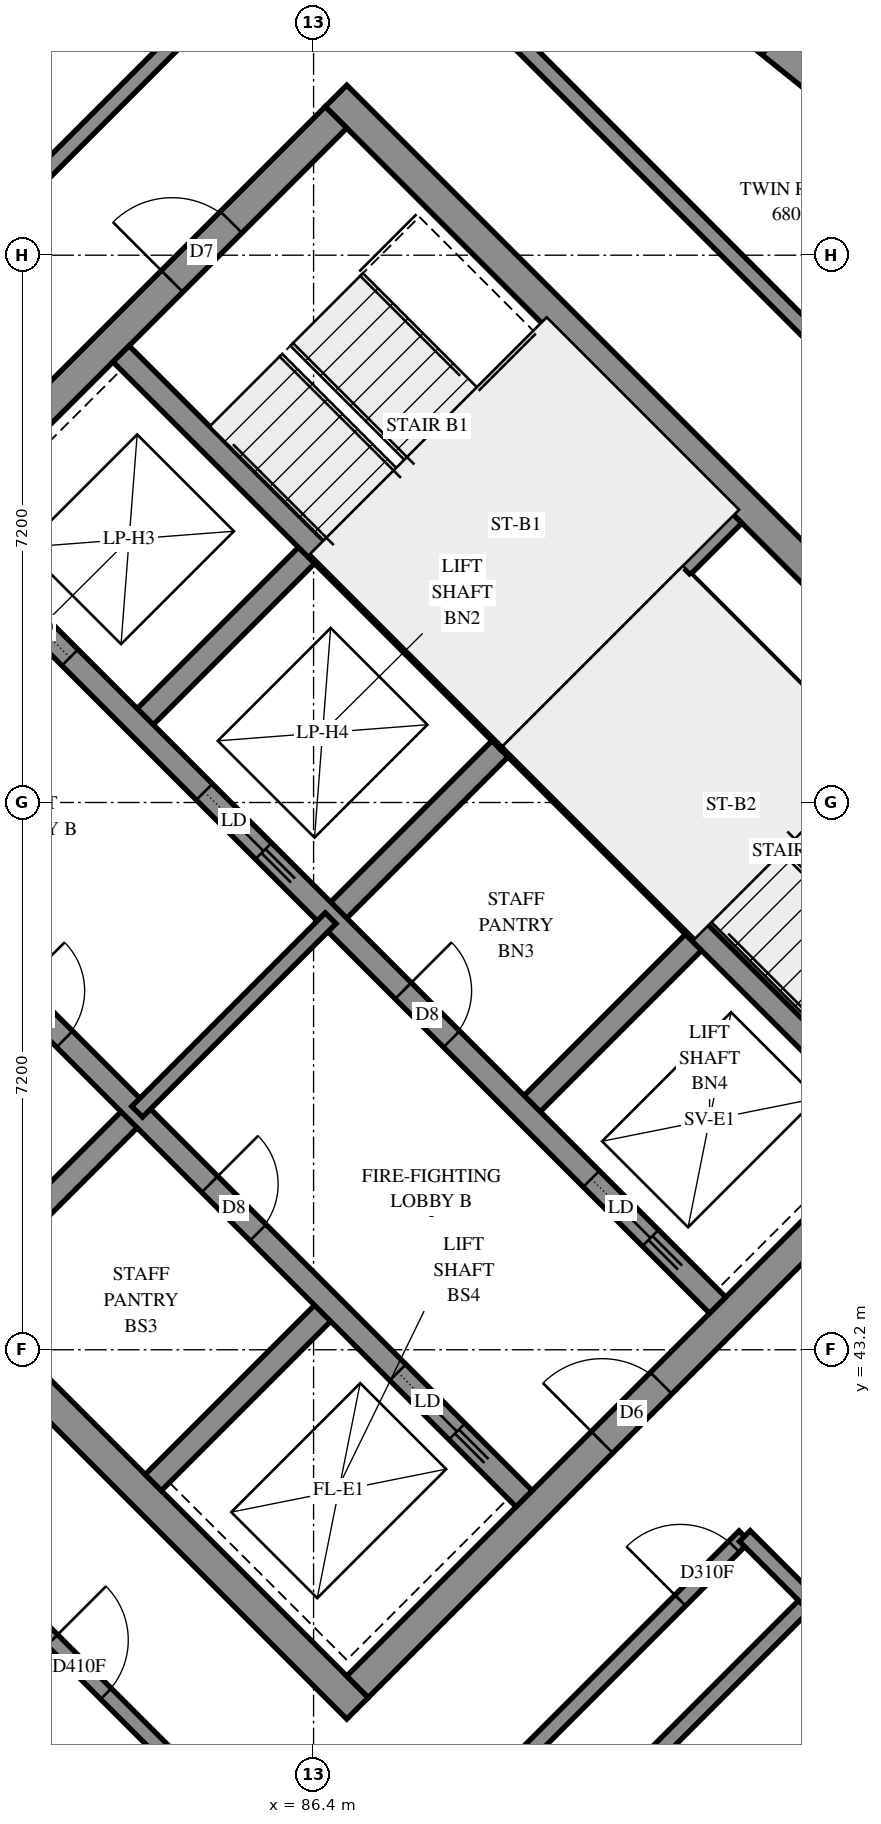
"""IFC4 building model, lengths in metres.
Left out: names, types, materials, properties, quantities, classifications, styles, units other than length and angle.
Written with IfcOpenShell. Run it as: python <this file> out.ifc"""

import sys

from ifc_helpers import new_model, si_unit, direction, frame, frame_2d, origin, place, context, subcontext, project, spatial, polyline, rectangle, outline, extrude, element, fill, save


model = new_model("IFC4")
c1 = context("Model", 3, precision=1e-05, world=origin(), true_north=direction((0.0, 1.0)))
c2 = subcontext(c1, "Body", "Model", "MODEL_VIEW")
j1 = project(units=[si_unit("LENGTHUNIT", "METRE"), si_unit("PLANEANGLEUNIT", "RADIAN")], contexts=[c1])
p1 = place(None, origin())
s1 = spatial("IfcSite", under=j1, at=p1, CompositionType="ELEMENT")
p2 = place(p1, origin())
s2 = spatial("IfcBuilding", under=s1, at=p2, CompositionType="ELEMENT")
p3 = place(p2, frame((0.0, 0.0, 250.6)))
s3 = spatial("IfcBuildingStorey", under=s2, at=p3, CompositionType="ELEMENT", Elevation=250.6)
p4 = place(p3, frame((76.23, 49.231, -0.3), z_axis=(0.0, 0.0, 1.0), x_axis=(0.7071034917, -0.7071100706, 0.0)))
e1 = element("IfcWall", 1, at=p4, inside=s3, PredefinedType="SHEAR", context=c2, shape_type="SweptSolid", body=[
    extrude(rectangle(XDim=15.2, YDim=0.4, at=frame_2d((7.6, 0.0))), origin(), (0.0, 0.0, 1.0), 2.7),
])
p5 = place(p3, frame((86.695, 59.696, -0.3), z_axis=(0.0, 0.0, 1.0), x_axis=(0.7071100706, -0.7071034917, 0.0)))
e2 = element("IfcWall", 2, at=p5, inside=s3, PredefinedType="SHEAR", context=c2, shape_type="SweptSolid", body=[
    extrude(rectangle(XDim=15.2, YDim=0.4, at=frame_2d((7.6, 0.0))), origin(), (0.0, 0.0, 1.0), 2.7),
])
p6 = place(p5, frame((10.4, 0.0, 0.3)))
e3 = element("IfcOpeningElement", 3, at=p6, cuts=e2, PredefinedType="OPENING", context=c2, shape_type="SweptSolid", body=[
    extrude(rectangle(XDim=0.8, YDim=2.1, at=frame_2d((0.4, 1.05))), frame((0.0, 0.21, 0.0), z_axis=(0.0, -1.0, 0.0), x_axis=(1.0, 0.0, 0.0)), (0.0, 0.0, 1.0), 0.42),
])
p7 = place(p3, frame((76.513, 49.231, -0.3), z_axis=(0.0, 0.0, 1.0), x_axis=(0.7071067812, 0.7071067812, 0.0)))
e4 = element("IfcWall", 4, at=p7, inside=s3, PredefinedType="SHEAR", context=c2, shape_type="SweptSolid", body=[
    extrude(rectangle(XDim=14.4, YDim=0.4, at=frame_2d((7.2, 0.0))), origin(), (0.0, 0.0, 1.0), 2.7),
])
p8 = place(p7, frame((4.55, 0.0, 0.3)))
e5 = element("IfcOpeningElement", 5, at=p8, cuts=e4, PredefinedType="OPENING", context=c2, shape_type="SweptSolid", body=[
    extrude(rectangle(XDim=1.1, YDim=2.1, at=frame_2d((0.55, 1.05))), frame((0.0, 0.21, 0.0), z_axis=(0.0, -1.0, 0.0), x_axis=(1.0, 0.0, 0.0)), (0.0, 0.0, 1.0), 0.42),
])
p9 = place(p7, frame((11.35, 0.0, 0.3)))
e6 = element("IfcOpeningElement", 6, at=p9, cuts=e4, PredefinedType="OPENING", context=c2, shape_type="SweptSolid", body=[
    extrude(rectangle(XDim=1.1, YDim=2.1, at=frame_2d((0.55, 1.05))), frame((0.0, 0.21, 0.0), z_axis=(0.0, -1.0, 0.0), x_axis=(1.0, 0.0, 0.0)), (0.0, 0.0, 1.0), 0.42),
])
p10 = place(p3, frame((86.978, 38.766, -0.3), z_axis=(0.0, 0.0, 1.0), x_axis=(0.7071067812, 0.7071067812, 0.0)))
e7 = element("IfcWall", 7, at=p10, inside=s3, PredefinedType="SHEAR", context=c2, shape_type="SweptSolid", body=[
    extrude(rectangle(XDim=14.4, YDim=0.4, at=frame_2d((7.2, 0.0))), origin(), (0.0, 0.0, 1.0), 2.7),
])
p11 = place(p10, frame((4.55, 0.0, 0.3)))
e8 = element("IfcOpeningElement", 8, at=p11, cuts=e7, PredefinedType="OPENING", context=c2, shape_type="SweptSolid", body=[
    extrude(rectangle(XDim=1.1, YDim=2.1, at=frame_2d((0.55, 1.05))), frame((0.0, 0.21, 0.0), z_axis=(0.0, -1.0, 0.0), x_axis=(1.0, 0.0, 0.0)), (0.0, 0.0, 1.0), 0.42),
])
p12 = place(p10, frame((11.35, 0.0, 0.3)))
e9 = element("IfcOpeningElement", 9, at=p12, cuts=e7, PredefinedType="OPENING", context=c2, shape_type="SweptSolid", body=[
    extrude(rectangle(XDim=1.1, YDim=2.1, at=frame_2d((0.55, 1.05))), frame((0.0, 0.21, 0.0), z_axis=(0.0, -1.0, 0.0), x_axis=(1.0, 0.0, 0.0)), (0.0, 0.0, 1.0), 0.42),
])
p13 = place(p3, frame((84.079, 51.423, 0.0), z_axis=(0.0, 0.0, 1.0), x_axis=(0.7071219326, 0.7070916295, 0.0)))
e10 = element("IfcWall", 10, at=p13, inside=s3, PredefinedType="SOLIDWALL", context=c2, shape_type="SweptSolid", body=[
    extrude(rectangle(XDim=3.3, YDim=0.3, at=frame_2d((1.65, 0.0))), origin(), (0.0, 0.0, 1.0), 3.1),
])
p14 = place(p3, frame((81.746, 43.999, 0.0), z_axis=(0.0, 0.0, 1.0), x_axis=(0.7071067812, 0.7071067812, 0.0)))
e11 = element("IfcWall", 11, at=p14, inside=s3, PredefinedType="SOLIDWALL", context=c2, shape_type="SweptSolid", body=[
    extrude(rectangle(XDim=3.3, YDim=0.3, at=frame_2d((1.65, 0.0))), origin(), (0.0, 0.0, 1.0), 3.1),
])
p15 = place(p3, frame((86.625, 48.878, 0.0), z_axis=(0.0, 0.0, 1.0), x_axis=(0.7071067812, 0.7071067812, 0.0)))
e12 = element("IfcWall", 12, at=p15, inside=s3, PredefinedType="SOLIDWALL", context=c2, shape_type="SweptSolid", body=[
    extrude(rectangle(XDim=3.3, YDim=0.3, at=frame_2d((1.65, 0.0))), origin(), (0.0, 0.0, 1.0), 3.1),
])
p16 = place(p3, frame((84.291, 41.453, 0.0), z_axis=(0.0, 0.0, 1.0), x_axis=(0.7071067812, 0.7071067812, 0.0)))
e13 = element("IfcWall", 13, at=p16, inside=s3, PredefinedType="SOLIDWALL", context=c2, shape_type="SweptSolid", body=[
    extrude(rectangle(XDim=3.3, YDim=0.3, at=frame_2d((1.65, 0.0))), origin(), (0.0, 0.0, 1.0), 3.1),
])
p17 = place(p3, frame((89.17, 46.332, 0.0), z_axis=(0.0, 0.0, 1.0), x_axis=(0.7071067812, 0.7071067812, 0.0)))
e14 = element("IfcWall", 14, at=p17, inside=s3, PredefinedType="SOLIDWALL", context=c2, shape_type="SweptSolid", body=[
    extrude(rectangle(XDim=3.3, YDim=0.3, at=frame_2d((1.65, 0.0))), origin(), (0.0, 0.0, 1.0), 3.1),
])
p18 = place(p3, frame((78.988, 51.423, 0.0), z_axis=(0.0, 0.0, 1.0), x_axis=(0.7071067812, -0.7071067812, 0.0)))
e15 = element("IfcWall", 15, at=p18, inside=s3, PredefinedType="SOLIDWALL", context=c2, shape_type="SweptSolid", body=[
    extrude(rectangle(XDim=14.4, YDim=0.3, at=frame_2d((7.2, 0.0))), origin(), (0.0, 0.0, 1.0), 3.1),
])
p19 = place(p18, frame((1.35, 0.0, 0.0)))
e16 = element("IfcOpeningElement", 16, at=p19, cuts=e15, PredefinedType="OPENING", context=c2, shape_type="SweptSolid", body=[
    extrude(rectangle(XDim=0.9, YDim=2.1, at=frame_2d((0.45, 1.05))), frame((0.0, 0.16, 0.0), z_axis=(0.0, -1.0, 0.0), x_axis=(1.0, 0.0, 0.0)), (0.0, 0.0, 1.0), 0.32),
])
p20 = place(p18, frame((4.95, 0.0, 0.0)))
e17 = element("IfcOpeningElement", 17, at=p20, cuts=e15, PredefinedType="OPENING", context=c2, shape_type="SweptSolid", body=[
    extrude(rectangle(XDim=0.9, YDim=2.1, at=frame_2d((0.45, 1.05))), frame((0.0, 0.16, 0.0), z_axis=(0.0, -1.0, 0.0), x_axis=(1.0, 0.0, 0.0)), (0.0, 0.0, 1.0), 0.32),
])
p21 = place(p18, frame((8.55, 0.0, 0.0)))
e18 = element("IfcOpeningElement", 18, at=p21, cuts=e15, PredefinedType="OPENING", context=c2, shape_type="SweptSolid", body=[
    extrude(rectangle(XDim=0.9, YDim=2.1, at=frame_2d((0.45, 1.05))), frame((0.0, 0.16, 0.0), z_axis=(0.0, -1.0, 0.0), x_axis=(1.0, 0.0, 0.0)), (0.0, 0.0, 1.0), 0.32),
])
p22 = place(p18, frame((12.05, 0.0, 0.0)))
e19 = element("IfcOpeningElement", 19, at=p22, cuts=e15, PredefinedType="OPENING", context=c2, shape_type="SweptSolid", body=[
    extrude(rectangle(XDim=1.1, YDim=2.1, at=frame_2d((0.55, 1.05))), frame((0.0, 0.16, 0.0), z_axis=(0.0, -1.0, 0.0), x_axis=(1.0, 0.0, 0.0)), (0.0, 0.0, 1.0), 0.32),
])
p23 = place(p3, frame((81.534, 53.969, 0.0), z_axis=(0.0, 0.0, 1.0), x_axis=(0.707103309, -0.7071102534, 0.0)))
e20 = element("IfcWall", 20, at=p23, inside=s3, PredefinedType="SOLIDWALL", context=c2, shape_type="SweptSolid", body=[
    extrude(rectangle(XDim=14.4, YDim=0.3, at=frame_2d((7.2, 0.0))), origin(), (0.0, 0.0, 1.0), 3.1),
])
p24 = place(p23, frame((8.55, 0.0, 0.0)))
e21 = element("IfcOpeningElement", 21, at=p24, cuts=e20, PredefinedType="OPENING", context=c2, shape_type="SweptSolid", body=[
    extrude(rectangle(XDim=0.9, YDim=2.1, at=frame_2d((0.45, 1.05))), frame((0.0, 0.16, 0.0), z_axis=(0.0, -1.0, 0.0), x_axis=(1.0, 0.0, 0.0)), (0.0, 0.0, 1.0), 0.32),
])
p25 = place(p23, frame((1.25, 0.0, 0.0)))
e22 = element("IfcOpeningElement", 22, at=p25, cuts=e20, PredefinedType="OPENING", context=c2, shape_type="SweptSolid", body=[
    extrude(rectangle(XDim=1.1, YDim=2.1, at=frame_2d((0.55, 1.05))), frame((0.0, 0.16, 0.0), z_axis=(0.0, -1.0, 0.0), x_axis=(1.0, 0.0, 0.0)), (0.0, 0.0, 1.0), 0.32),
])
p26 = place(p23, frame((4.85, 0.0, 0.0)))
e23 = element("IfcOpeningElement", 23, at=p26, cuts=e20, PredefinedType="OPENING", context=c2, shape_type="SweptSolid", body=[
    extrude(rectangle(XDim=1.1, YDim=2.1, at=frame_2d((0.55, 1.05))), frame((0.0, 0.16, 0.0), z_axis=(0.0, -1.0, 0.0), x_axis=(1.0, 0.0, 0.0)), (0.0, 0.0, 1.0), 0.32),
])
p27 = place(p23, frame((12.05, 0.0, 0.0)))
e24 = element("IfcOpeningElement", 24, at=p27, cuts=e20, PredefinedType="OPENING", context=c2, shape_type="SweptSolid", body=[
    extrude(rectangle(XDim=1.1, YDim=2.1, at=frame_2d((0.55, 1.05))), frame((0.0, 0.16, 0.0), z_axis=(0.0, -1.0, 0.0), x_axis=(1.0, 0.0, 0.0)), (0.0, 0.0, 1.0), 0.32),
])
for number, where, z_axis, x_axis in (
    (25, (83.867, 56.302, 0.0), (0.0, 0.0, 1.0), (0.707, -0.707, 0.0)),
    (26, (88.958, 51.211, 0.0), (0.0, 0.0, 1.0), (0.707, -0.707, 0.0)),
):
    element("IfcWall", number, at=place(p3, frame(where, z_axis=z_axis, x_axis=x_axis)), inside=s3, PredefinedType="SOLIDWALL", context=c2, shape_type="SweptSolid", body=[
        extrude(rectangle(XDim=7.2, YDim=0.3, at=frame_2d((3.6, 0.0))), origin(), (0.0, 0.0, 1.0), 3.1),
    ])
p28 = place(p3, frame((88.958, 51.211, 0.0), z_axis=(0.0, 0.0, 1.0), x_axis=(0.7071067812, 0.7071067812, 0.0)))
e27 = element("IfcWall", 27, at=p28, inside=s3, PredefinedType="SOLIDWALL", context=c2, shape_type="SweptSolid", body=[
    extrude(rectangle(XDim=4.2, YDim=0.3, at=frame_2d((2.1, 0.0))), origin(), (0.0, 0.0, 1.0), 3.1),
])
p29 = place(p3, frame((93.637, 59.451, 0.0), z_axis=(0.0, 0.0, 1.0), x_axis=(-0.7792026718, 0.6267720449, 0.0)))
e28 = element("IfcWall", 28, at=p29, inside=s3, PredefinedType="SOLIDWALL", context=c2, shape_type="SweptSolid", body=[
    extrude(outline(polyline([(-0.024, -0.225), (3.325, -0.225), (3.373, 0.225), (0.024, 0.225), (-0.024, -0.225)])), origin(), (0.0, 0.0, 1.0), 3.1),
])
p30 = place(p29, frame((1.519, 0.0, 0.45)))
e29 = element("IfcOpeningElement", 29, at=p30, cuts=e28, PredefinedType="OPENING", context=c2, shape_type="SweptSolid", body=[
    extrude(rectangle(XDim=1.2, YDim=2.55, at=frame_2d((0.6, 1.275))), frame((0.0, 0.235, 0.0), z_axis=(0.0, -1.0, 0.0), x_axis=(1.0, 0.0, 0.0)), (0.0, 0.0, 1.0), 0.47),
])
p31 = place(p3, frame((91.313, 53.354, 0.0), z_axis=(0.0, 0.0, 1.0), x_axis=(0.7071067812, -0.7071067812, 0.0)))
e30 = element("IfcWall", 30, at=p31, inside=s3, PredefinedType="PARTITIONING", context=c2, shape_type="SweptSolid", body=[
    extrude(rectangle(XDim=5.65, YDim=0.15, at=frame_2d((2.825, 0.0))), origin(), (0.0, 0.0, 1.0), 3.1),
])
p32 = place(p3, frame((84.079, 46.332, 0.0), z_axis=(0.0, 0.0, 1.0), x_axis=(0.7071067812, 0.7071067812, 0.0)))
e31 = element("IfcWall", 31, at=p32, inside=s3, PredefinedType="PARTITIONING", context=c2, shape_type="SweptSolid", body=[
    extrude(rectangle(XDim=3.6, YDim=0.2, at=frame_2d((1.8, 0.0))), origin(), (0.0, 0.0, 1.0), 3.1),
])
p33 = place(p3, frame((84.939, 31.92, 0.0), z_axis=(0.0, 0.0, 1.0), x_axis=(0.7071067812, 0.7071067812, 0.0)))
e32 = element("IfcWall", 32, at=p33, inside=s3, PredefinedType="PARTITIONING", context=c2, shape_type="SweptSolid", body=[
    extrude(rectangle(XDim=11.283, YDim=0.2, at=frame_2d((5.641, 0.0))), origin(), (0.0, 0.0, 1.0), 3.1),
])
p34 = place(p3, frame((79.907, 55.739, 0.0), z_axis=(0.0, 0.0, 1.0), x_axis=(0.7071067812, 0.7071067812, 0.0)))
e33 = element("IfcWall", 33, at=p34, inside=s3, PredefinedType="PARTITIONING", context=c2, shape_type="SweptSolid", body=[
    extrude(rectangle(XDim=9.798, YDim=0.2, at=frame_2d((4.899, 0.0))), origin(), (0.0, 0.0, 1.0), 3.1),
])
p35 = place(p34, frame((0.617, 0.0, 0.0)))
e34 = element("IfcOpeningElement", 34, at=p35, cuts=e33, PredefinedType="OPENING", context=c2, shape_type="SweptSolid", body=[
    extrude(rectangle(XDim=1.0, YDim=2.1, at=frame_2d((0.5, 1.05))), frame((0.0, 0.11, 0.0), z_axis=(0.0, -1.0, 0.0), x_axis=(1.0, 0.0, 0.0)), (0.0, 0.0, 1.0), 0.22),
])
p36 = place(p3, frame((80.747, 41.597, 0.0), z_axis=(0.0, 0.0, 1.0), x_axis=(0.7071067812, -0.7071067812, 0.0)))
e35 = element("IfcWall", 35, at=p36, inside=s3, PredefinedType="PARTITIONING", context=c2, shape_type="SweptSolid", body=[
    extrude(rectangle(XDim=8.607, YDim=0.2, at=frame_2d((4.303, 0.0))), origin(), (0.0, 0.0, 1.0), 3.1),
])
p37 = place(p36, frame((0.195, 0.0, 0.0)))
e36 = element("IfcOpeningElement", 36, at=p37, cuts=e35, PredefinedType="OPENING", context=c2, shape_type="SweptSolid", body=[
    extrude(rectangle(XDim=1.0, YDim=2.1, at=frame_2d((0.5, 1.05))), frame((0.0, 0.11, 0.0), z_axis=(0.0, -1.0, 0.0), x_axis=(1.0, 0.0, 0.0)), (0.0, 0.0, 1.0), 0.22),
])
p38 = place(p36, frame((3.133, 0.0, 0.0)))
e37 = element("IfcOpeningElement", 37, at=p38, cuts=e35, PredefinedType="OPENING", context=c2, shape_type="SweptSolid", body=[
    extrude(rectangle(XDim=1.0, YDim=2.1, at=frame_2d((0.5, 1.05))), frame((0.0, 0.11, 0.0), z_axis=(0.0, -1.0, 0.0), x_axis=(1.0, 0.0, 0.0)), (0.0, 0.0, 1.0), 0.22),
])
p39 = place(p3, frame((86.836, 35.514, 0.0), z_axis=(0.0, 0.0, 1.0), x_axis=(0.7071067812, 0.7071067812, 0.0)))
e38 = element("IfcWall", 38, at=p39, inside=s3, PredefinedType="PARTITIONING", context=c2, shape_type="SweptSolid", body=[
    extrude(rectangle(XDim=7.399, YDim=0.2, at=frame_2d((3.7, 0.0))), origin(), (0.0, 0.0, 1.0), 3.1),
])
p40 = place(p39, frame((6.207, 0.0, 0.0)))
e39 = element("IfcOpeningElement", 39, at=p40, cuts=e38, PredefinedType="OPENING", context=c2, shape_type="SweptSolid", body=[
    extrude(rectangle(XDim=1.0, YDim=2.1, at=frame_2d((0.5, 1.05))), frame((0.0, 0.11, 0.0), z_axis=(0.0, -1.0, 0.0), x_axis=(1.0, 0.0, 0.0)), (0.0, 0.0, 1.0), 0.22),
])
p41 = place(p3, frame((88.535, 60.971, 0.0), z_axis=(0.0, 0.0, 1.0), x_axis=(0.7069678741, -0.707245661, 0.0)))
e40 = element("IfcWall", 40, at=p41, inside=s3, PredefinedType="PARTITIONING", context=c2, shape_type="SweptSolid", body=[
    extrude(rectangle(XDim=7.2, YDim=0.2, at=frame_2d((3.6, 0.0))), origin(), (0.0, 0.0, 1.0), 3.1),
])
p42 = place(p3, frame((92.073, 40.749, 0.0), z_axis=(0.0, 0.0, 1.0), x_axis=(0.7071067812, -0.7071067812, 0.0)))
e41 = element("IfcWall", 41, at=p42, inside=s3, PredefinedType="PARTITIONING", context=c2, shape_type="SweptSolid", body=[
    extrude(rectangle(XDim=4.8, YDim=0.2, at=frame_2d((2.4, 0.0))), origin(), (0.0, 0.0, 1.0), 3.1),
])
p43 = place(p42, frame((1.725, 0.0, 0.0)))
e42 = element("IfcOpeningElement", 42, at=p43, cuts=e41, PredefinedType="OPENING", context=c2, shape_type="SweptSolid", body=[
    extrude(rectangle(XDim=1.0, YDim=2.1, at=frame_2d((0.5, 1.05))), frame((0.0, 0.11, 0.0), z_axis=(0.0, -1.0, 0.0), x_axis=(1.0, 0.0, 0.0)), (0.0, 0.0, 1.0), 0.22),
])
p44 = place(p30, origin())
e43 = element("IfcWindow", 43, at=p44, inside=s3, PartitioningType="SINGLE_PANEL", PredefinedType="WINDOW", context=c2, shape_type="SweptSolid", body=[
    extrude(rectangle(XDim=1.2, YDim=2.55, at=frame_2d((0.6, 1.275))), frame((0.0, 0.205, 0.0), z_axis=(0.0, -1.0, 0.0), x_axis=(1.0, 0.0, 0.0)), (0.0, 0.0, 1.0), 0.06),
])
fill(e29, e43)
p45 = place(p11, origin())
e44 = element("IfcDoor", 44, at=p45, inside=s3, OperationType="DOUBLE_DOOR_SINGLE_SWING", PredefinedType="DOOR", context=c2, shape_type="SweptSolid", body=[
    extrude(rectangle(XDim=1.1, YDim=2.1, at=frame_2d((0.55, 1.05))), frame((0.0, 0.025, 0.0), z_axis=(0.0, -1.0, 0.0), x_axis=(1.0, 0.0, 0.0)), (0.0, 0.0, 1.0), 0.05),
])
fill(e8, e44)
p46 = place(p9, origin())
e45 = element("IfcDoor", 45, at=p46, inside=s3, OperationType="SINGLE_SWING_LEFT", PredefinedType="DOOR", context=c2, shape_type="SweptSolid", body=[
    extrude(rectangle(XDim=1.1, YDim=2.1, at=frame_2d((0.55, 1.05))), frame((0.0, 0.025, 0.0), z_axis=(0.0, -1.0, 0.0), x_axis=(1.0, 0.0, 0.0)), (0.0, 0.0, 1.0), 0.05),
])
fill(e6, e45)
p47 = place(p20, origin())
e46 = element("IfcDoor", 46, at=p47, inside=s3, OperationType="SINGLE_SWING_LEFT", PredefinedType="DOOR", context=c2, shape_type="SweptSolid", body=[
    extrude(rectangle(XDim=0.9, YDim=2.1, at=frame_2d((0.45, 1.05))), frame((0.0, 0.025, 0.0), z_axis=(0.0, -1.0, 0.0), x_axis=(1.0, 0.0, 0.0)), (0.0, 0.0, 1.0), 0.05),
])
fill(e17, e46)
p48 = place(p21, origin())
e47 = element("IfcDoor", 47, at=p48, inside=s3, OperationType="SINGLE_SWING_LEFT", PredefinedType="DOOR", context=c2, shape_type="SweptSolid", body=[
    extrude(rectangle(XDim=0.9, YDim=2.1, at=frame_2d((0.45, 1.05))), frame((0.0, 0.025, 0.0), z_axis=(0.0, -1.0, 0.0), x_axis=(1.0, 0.0, 0.0)), (0.0, 0.0, 1.0), 0.05),
])
fill(e18, e47)
p49 = place(p24, origin())
e48 = element("IfcDoor", 48, at=p49, inside=s3, OperationType="SINGLE_SWING_LEFT", PredefinedType="DOOR", context=c2, shape_type="SweptSolid", body=[
    extrude(rectangle(XDim=0.9, YDim=2.1, at=frame_2d((0.45, 1.05))), frame((0.0, 0.025, 0.0), z_axis=(0.0, -1.0, 0.0), x_axis=(1.0, 0.0, 0.0)), (0.0, 0.0, 1.0), 0.05),
])
fill(e21, e48)
p50 = place(p22, origin())
e49 = element("IfcDoor", 49, at=p50, inside=s3, OperationType="SLIDING_TO_RIGHT", PredefinedType="DOOR", context=c2, shape_type="SweptSolid", body=[
    extrude(rectangle(XDim=1.1, YDim=2.1, at=frame_2d((0.55, 1.05))), frame((0.0, 0.025, 0.0), z_axis=(0.0, -1.0, 0.0), x_axis=(1.0, 0.0, 0.0)), (0.0, 0.0, 1.0), 0.05),
])
fill(e19, e49)
p51 = place(p25, origin())
e50 = element("IfcDoor", 50, at=p51, inside=s3, OperationType="SLIDING_TO_LEFT", PredefinedType="DOOR", context=c2, shape_type="SweptSolid", body=[
    extrude(rectangle(XDim=1.1, YDim=2.1, at=frame_2d((0.55, 1.05))), frame((0.0, 0.025, 0.0), z_axis=(0.0, -1.0, 0.0), x_axis=(1.0, 0.0, 0.0)), (0.0, 0.0, 1.0), 0.05),
])
fill(e22, e50)
p52 = place(p26, origin())
e51 = element("IfcDoor", 51, at=p52, inside=s3, OperationType="SLIDING_TO_RIGHT", PredefinedType="DOOR", context=c2, shape_type="SweptSolid", body=[
    extrude(rectangle(XDim=1.1, YDim=2.1, at=frame_2d((0.55, 1.05))), frame((0.0, 0.025, 0.0), z_axis=(0.0, -1.0, 0.0), x_axis=(1.0, 0.0, 0.0)), (0.0, 0.0, 1.0), 0.05),
])
fill(e23, e51)
p53 = place(p27, origin())
e52 = element("IfcDoor", 52, at=p53, inside=s3, OperationType="SLIDING_TO_RIGHT", PredefinedType="DOOR", context=c2, shape_type="SweptSolid", body=[
    extrude(rectangle(XDim=1.1, YDim=2.1, at=frame_2d((0.55, 1.05))), frame((0.0, 0.025, 0.0), z_axis=(0.0, -1.0, 0.0), x_axis=(1.0, 0.0, 0.0)), (0.0, 0.0, 1.0), 0.05),
])
fill(e24, e52)
p54 = place(p38, origin())
e53 = element("IfcDoor", 53, at=p54, inside=s3, OperationType="SINGLE_SWING_LEFT", PredefinedType="DOOR", context=c2, shape_type="SweptSolid", body=[
    extrude(rectangle(XDim=1.0, YDim=2.1, at=frame_2d((0.5, 1.05))), frame((0.0, 0.025, 0.0), z_axis=(0.0, -1.0, 0.0), x_axis=(1.0, 0.0, 0.0)), (0.0, 0.0, 1.0), 0.05),
])
fill(e37, e53)
p55 = place(p40, origin())
e54 = element("IfcDoor", 54, at=p55, inside=s3, OperationType="SINGLE_SWING_RIGHT", PredefinedType="DOOR", context=c2, shape_type="SweptSolid", body=[
    extrude(rectangle(XDim=1.0, YDim=2.1, at=frame_2d((0.5, 1.05))), frame((0.0, 0.025, 0.0), z_axis=(0.0, -1.0, 0.0), x_axis=(1.0, 0.0, 0.0)), (0.0, 0.0, 1.0), 0.05),
])
fill(e39, e54)
save(model, sys.argv[1])
